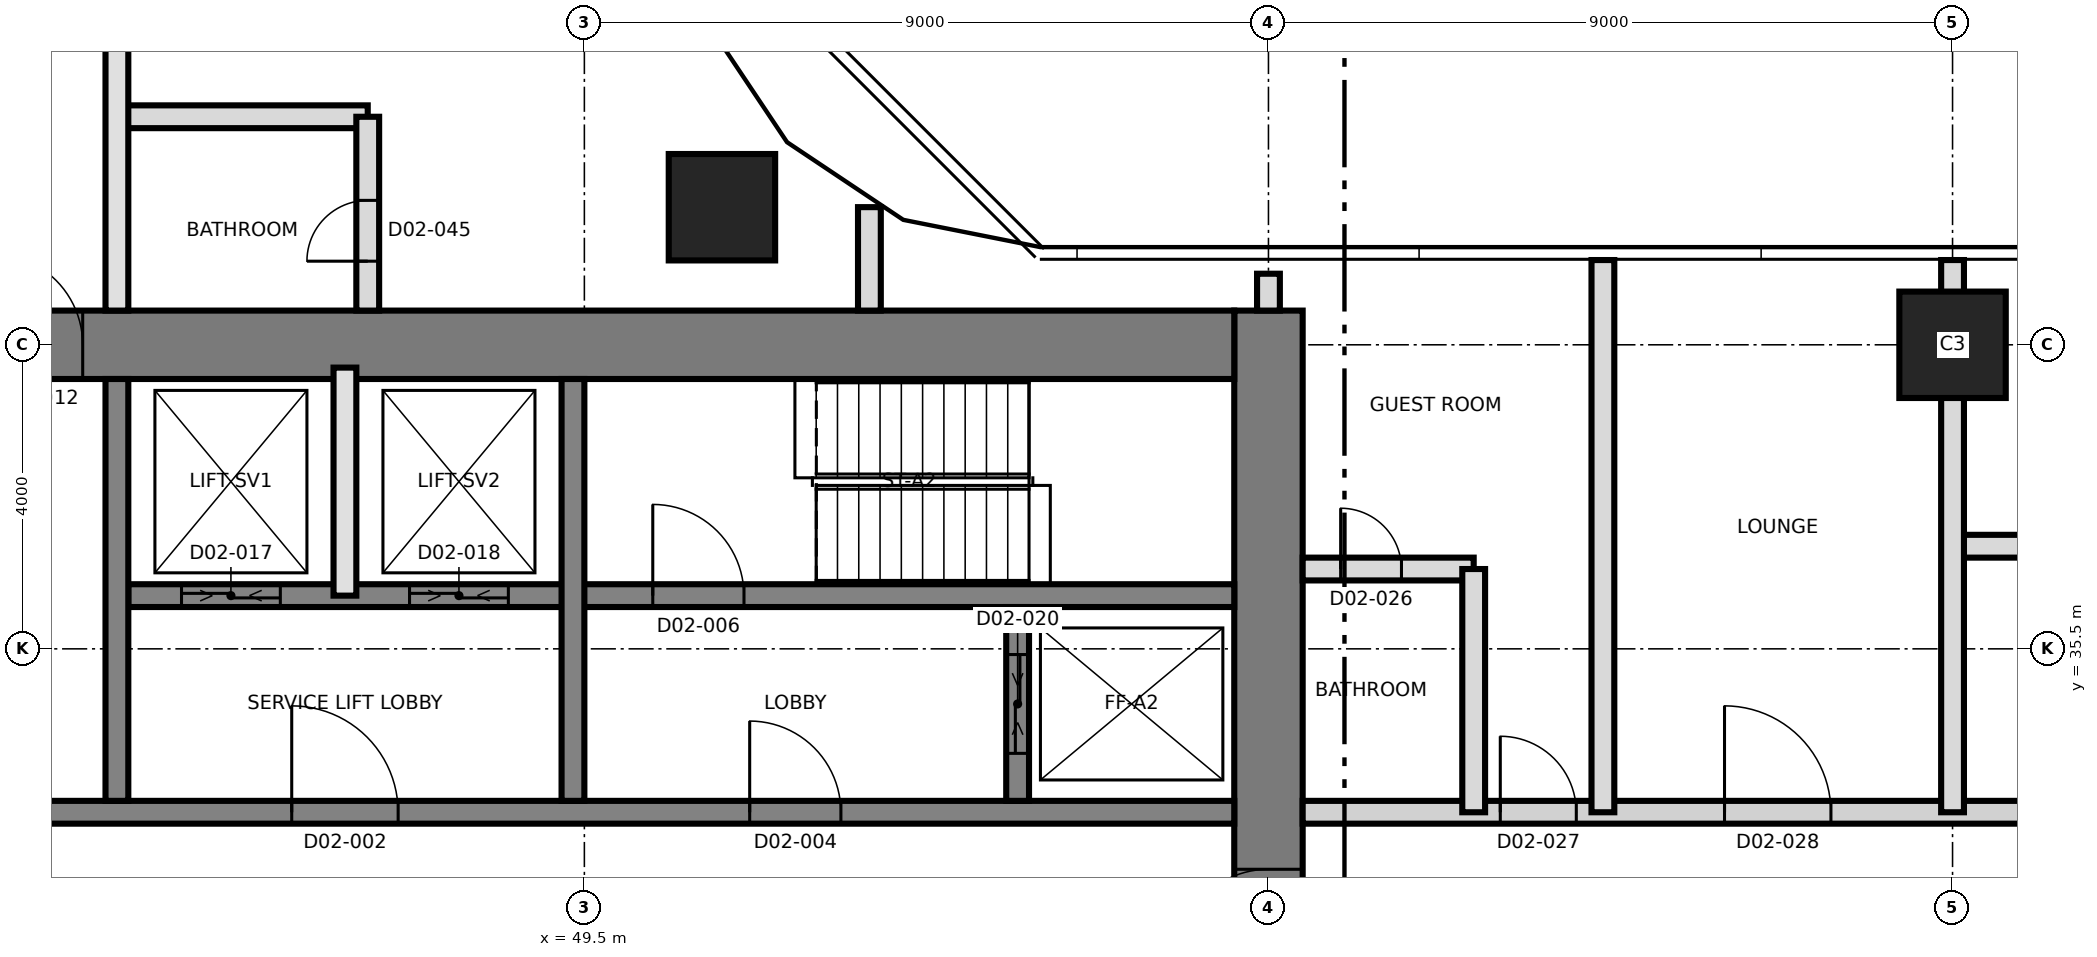
"""IFC4 building model, lengths in metres.
Left out: names, types, materials, properties, quantities, classifications, styles, units other than length and angle.
Written with IfcOpenShell. Run it as: python <this file> out.ifc"""

import sys

from ifc_helpers import new_model, si_unit, direction, frame, frame_2d, origin, origin_2d, place, context, subcontext, project, spatial, rectangle, extrude, element, fill, save


model = new_model("IFC4")
c1 = context("Model", 3, precision=1e-05, world=origin(), true_north=direction((0.0, 1.0)))
c2 = subcontext(c1, "Body", "Model", "MODEL_VIEW")
j1 = project(units=[si_unit("LENGTHUNIT", "METRE"), si_unit("PLANEANGLEUNIT", "RADIAN")], contexts=[c1])
p1 = place(None, origin())
s1 = spatial("IfcSite", under=j1, at=p1, CompositionType="ELEMENT")
p2 = place(p1, origin())
s2 = spatial("IfcBuilding", under=s1, at=p2, CompositionType="ELEMENT")
p3 = place(p2, frame((0.0, 0.0, 48.3)))
s3 = spatial("IfcBuildingStorey", under=s2, at=p3, CompositionType="ELEMENT", Elevation=48.3)
p4 = place(p3, frame((58.5, 21.05, 0.0), z_axis=(0.0, 0.0, 1.0), x_axis=(0.0, 1.0, 0.0)))
e1 = element("IfcWall", 1, at=p4, inside=s3, PredefinedType="SHEAR", context=c2, shape_type="SweptSolid", body=[
    extrude(rectangle(XDim=18.9, YDim=0.9, at=frame_2d((9.45, 0.0))), origin(), (0.0, 0.0, 1.0), 3.7),
])
p5 = place(p4, frame((10.35, 0.0, 0.0)))
e2 = element("IfcOpeningElement", 2, at=p5, cuts=e1, PredefinedType="OPENING", context=c2, shape_type="SweptSolid", body=[
    extrude(rectangle(XDim=1.2, YDim=2.1, at=frame_2d((0.6, 1.05))), frame((0.0, 0.46, 0.0), z_axis=(0.0, -1.0, 0.0), x_axis=(1.0, 0.0, 0.0)), (0.0, 0.0, 1.0), 0.92),
])
p6 = place(p3, frame((31.05, 39.5, 0.0), z_axis=(0.0, 0.0, 1.0), x_axis=(1.0, 0.0, 0.0)))
e3 = element("IfcWall", 3, at=p6, inside=s3, PredefinedType="SHEAR", context=c2, shape_type="SweptSolid", body=[
    extrude(rectangle(XDim=27.0, YDim=0.9, at=frame_2d((13.5, 0.0))), origin(), (0.0, 0.0, 1.0), 3.7),
])
p7 = place(p6, frame((10.65, 0.0, 0.0)))
e4 = element("IfcOpeningElement", 4, at=p7, cuts=e3, PredefinedType="OPENING", context=c2, shape_type="SweptSolid", body=[
    extrude(rectangle(XDim=1.2, YDim=2.1, at=frame_2d((0.6, 1.05))), frame((0.0, 0.46, 0.0), z_axis=(0.0, -1.0, 0.0), x_axis=(1.0, 0.0, 0.0)), (0.0, 0.0, 1.0), 0.92),
])
p8 = place(p3, frame((31.95, 33.35, 0.0), z_axis=(0.0, 0.0, 1.0), x_axis=(1.0, 0.0, 0.0)))
e5 = element("IfcWall", 5, at=p8, inside=s3, PredefinedType="SHEAR", context=c2, shape_type="SweptSolid", body=[
    extrude(rectangle(XDim=26.1, YDim=0.3, at=frame_2d((13.05, 0.0))), origin(), (0.0, 0.0, 1.0), 3.7),
])
p9 = place(p8, frame((13.7, 0.0, 0.0)))
e6 = element("IfcOpeningElement", 6, at=p9, cuts=e5, PredefinedType="OPENING", context=c2, shape_type="SweptSolid", body=[
    extrude(rectangle(XDim=1.4, YDim=2.1, at=frame_2d((0.7, 1.05))), frame((0.0, 0.16, 0.0), z_axis=(0.0, -1.0, 0.0), x_axis=(1.0, 0.0, 0.0)), (0.0, 0.0, 1.0), 0.32),
])
p10 = place(p8, frame((5.175, 0.0, 0.0)))
e7 = element("IfcOpeningElement", 7, at=p10, cuts=e5, PredefinedType="OPENING", context=c2, shape_type="SweptSolid", body=[
    extrude(rectangle(XDim=1.2, YDim=2.1, at=frame_2d((0.6, 1.05))), frame((0.0, 0.16, 0.0), z_axis=(0.0, -1.0, 0.0), x_axis=(1.0, 0.0, 0.0)), (0.0, 0.0, 1.0), 0.32),
])
p11 = place(p8, frame((19.725, 0.0, 0.0)))
e8 = element("IfcOpeningElement", 8, at=p11, cuts=e5, PredefinedType="OPENING", context=c2, shape_type="SweptSolid", body=[
    extrude(rectangle(XDim=1.2, YDim=2.1, at=frame_2d((0.6, 1.05))), frame((0.0, 0.16, 0.0), z_axis=(0.0, -1.0, 0.0), x_axis=(1.0, 0.0, 0.0)), (0.0, 0.0, 1.0), 0.32),
])
p12 = place(p3, frame((43.5, 36.2, 0.0), z_axis=(0.0, 0.0, 1.0), x_axis=(1.0, 0.0, 0.0)))
e9 = element("IfcWall", 9, at=p12, inside=s3, PredefinedType="SHEAR", context=c2, shape_type="SweptSolid", body=[
    extrude(rectangle(XDim=14.55, YDim=0.3, at=frame_2d((7.275, 0.0))), origin(), (0.0, 0.0, 1.0), 3.7),
])
p13 = place(p12, frame((6.9, 0.0, 0.0)))
e10 = element("IfcOpeningElement", 10, at=p13, cuts=e9, PredefinedType="OPENING", context=c2, shape_type="SweptSolid", body=[
    extrude(rectangle(XDim=1.2, YDim=2.1, at=frame_2d((0.6, 1.05))), frame((0.0, 0.16, 0.0), z_axis=(0.0, -1.0, 0.0), x_axis=(1.0, 0.0, 0.0)), (0.0, 0.0, 1.0), 0.32),
])
p14 = place(p12, frame((0.7, 0.0, 0.0)))
e11 = element("IfcOpeningElement", 11, at=p14, cuts=e9, PredefinedType="OPENING", context=c2, shape_type="SweptSolid", body=[
    extrude(rectangle(XDim=1.3, YDim=2.4, at=frame_2d((0.65, 1.2))), frame((0.0, 0.16, 0.0), z_axis=(0.0, -1.0, 0.0), x_axis=(1.0, 0.0, 0.0)), (0.0, 0.0, 1.0), 0.32),
])
p15 = place(p12, frame((3.7, 0.0, 0.0)))
e12 = element("IfcOpeningElement", 12, at=p15, cuts=e9, PredefinedType="OPENING", context=c2, shape_type="SweptSolid", body=[
    extrude(rectangle(XDim=1.3, YDim=2.4, at=frame_2d((0.65, 1.2))), frame((0.0, 0.16, 0.0), z_axis=(0.0, -1.0, 0.0), x_axis=(1.0, 0.0, 0.0)), (0.0, 0.0, 1.0), 0.32),
])
for number, where, z_axis, x_axis in (
    (13, (43.35, 33.5, 0.0), (0.0, 0.0, 1.0), (0.0, 1.0, 0.0)),
    (14, (49.35, 33.5, 0.0), (0.0, 0.0, 1.0), (0.0, 1.0, 0.0)),
):
    element("IfcWall", number, at=place(p3, frame(where, z_axis=z_axis, x_axis=x_axis)), inside=s3, PredefinedType="SHEAR", context=c2, shape_type="SweptSolid", body=[
        extrude(rectangle(XDim=5.55, YDim=0.3, at=frame_2d((2.775, 0.0))), origin(), (0.0, 0.0, 1.0), 3.7),
    ])
p16 = place(p3, frame((55.2, 33.5, 0.0), z_axis=(0.0, 0.0, 1.0), x_axis=(0.0, 1.0, 0.0)))
e15 = element("IfcWall", 15, at=p16, inside=s3, PredefinedType="SHEAR", context=c2, shape_type="SweptSolid", body=[
    extrude(rectangle(XDim=2.55, YDim=0.3, at=frame_2d((1.275, 0.0))), origin(), (0.0, 0.0, 1.0), 3.7),
])
p17 = place(p16, frame((0.625, 0.0, 0.0)))
e16 = element("IfcOpeningElement", 16, at=p17, cuts=e15, PredefinedType="OPENING", context=c2, shape_type="SweptSolid", body=[
    extrude(rectangle(XDim=1.3, YDim=2.4, at=frame_2d((0.65, 1.2))), frame((0.0, 0.16, 0.0), z_axis=(0.0, -1.0, 0.0), x_axis=(1.0, 0.0, 0.0)), (0.0, 0.0, 1.0), 0.32),
])
for number, where, z_axis, x_axis in (
    (17, (67.5, 39.5, 0.0), (0.0, 0.0, 1.0), (1.0, 0.0, 0.0)),
    (18, (51.31, 41.31, 0.0), (0.0, 0.0, 1.0), (1.0, 0.0, 0.0)),
):
    element("IfcColumn", number, at=place(p3, frame(where, z_axis=z_axis, x_axis=x_axis)), inside=s3, PredefinedType="COLUMN", context=c2, shape_type="SweptSolid", body=[
        extrude(rectangle(XDim=1.4, YDim=1.4, at=origin_2d()), origin(), (0.0, 0.0, 1.0), 3.7),
    ])
p18 = place(p3, frame((46.35, 36.2, 0.0), z_axis=(0.0, 0.0, 1.0), x_axis=(0.0, 1.0, 0.0)))
e19 = element("IfcWall", 19, at=p18, inside=s3, PredefinedType="SOLIDWALL", context=c2, shape_type="SweptSolid", body=[
    extrude(rectangle(XDim=3.0, YDim=0.3, at=frame_2d((1.5, 0.0))), origin(), (0.0, 0.0, 1.0), 3.4),
])
p19 = place(p3, frame((58.95, 33.35, 0.0), z_axis=(0.0, 0.0, 1.0), x_axis=(1.0, 0.0, 0.0)))
e20 = element("IfcWall", 20, at=p19, inside=s3, PredefinedType="PARTITIONING", context=c2, shape_type="SweptSolid", body=[
    extrude(rectangle(XDim=26.38, YDim=0.3, at=frame_2d((13.19, 0.0))), origin(), (0.0, 0.0, 1.0), 3.4),
])
p20 = place(p19, frame((2.6, 0.0, 0.0)))
e21 = element("IfcOpeningElement", 21, at=p20, cuts=e20, PredefinedType="OPENING", context=c2, shape_type="SweptSolid", body=[
    extrude(rectangle(XDim=1.0, YDim=2.1, at=frame_2d((0.5, 1.05))), frame((0.0, 0.16, 0.0), z_axis=(0.0, -1.0, 0.0), x_axis=(1.0, 0.0, 0.0)), (0.0, 0.0, 1.0), 0.32),
])
p21 = place(p19, frame((5.55, 0.0, 0.0)))
e22 = element("IfcOpeningElement", 22, at=p21, cuts=e20, PredefinedType="OPENING", context=c2, shape_type="SweptSolid", body=[
    extrude(rectangle(XDim=1.4, YDim=2.1, at=frame_2d((0.7, 1.05))), frame((0.0, 0.16, 0.0), z_axis=(0.0, -1.0, 0.0), x_axis=(1.0, 0.0, 0.0)), (0.0, 0.0, 1.0), 0.32),
])
p22 = place(p19, frame((14.2, 0.0, 0.0)))
e23 = element("IfcOpeningElement", 23, at=p22, cuts=e20, PredefinedType="OPENING", context=c2, shape_type="SweptSolid", body=[
    extrude(rectangle(XDim=1.0, YDim=2.4, at=frame_2d((0.5, 1.2))), frame((0.0, 0.16, 0.0), z_axis=(0.0, -1.0, 0.0), x_axis=(1.0, 0.0, 0.0)), (0.0, 0.0, 1.0), 0.32),
])
p23 = place(p19, frame((20.83, 0.0, 0.0)))
e24 = element("IfcOpeningElement", 24, at=p23, cuts=e20, PredefinedType="OPENING", context=c2, shape_type="SweptSolid", body=[
    extrude(rectangle(XDim=1.0, YDim=2.1, at=frame_2d((0.5, 1.05))), frame((0.0, 0.16, 0.0), z_axis=(0.0, -1.0, 0.0), x_axis=(1.0, 0.0, 0.0)), (0.0, 0.0, 1.0), 0.32),
])
p24 = place(p19, frame((22.63, 0.0, 0.0)))
e25 = element("IfcOpeningElement", 25, at=p24, cuts=e20, PredefinedType="OPENING", context=c2, shape_type="SweptSolid", body=[
    extrude(rectangle(XDim=1.0, YDim=2.1, at=frame_2d((0.5, 1.05))), frame((0.0, 0.16, 0.0), z_axis=(0.0, -1.0, 0.0), x_axis=(1.0, 0.0, 0.0)), (0.0, 0.0, 1.0), 0.32),
])
p25 = place(p3, frame((58.95, 36.55, 0.0), z_axis=(0.0, 0.0, 1.0), x_axis=(1.0, 0.0, 0.0)))
e26 = element("IfcWall", 26, at=p25, inside=s3, PredefinedType="PARTITIONING", context=c2, shape_type="SweptSolid", body=[
    extrude(rectangle(XDim=2.25, YDim=0.3, at=frame_2d((1.125, 0.0))), origin(), (0.0, 0.0, 1.0), 3.4),
])
p26 = place(p25, frame((0.5, 0.0, 0.0)))
e27 = element("IfcOpeningElement", 27, at=p26, cuts=e26, PredefinedType="OPENING", context=c2, shape_type="SweptSolid", body=[
    extrude(rectangle(XDim=0.8, YDim=2.1, at=frame_2d((0.4, 1.05))), frame((0.0, 0.16, 0.0), z_axis=(0.0, -1.0, 0.0), x_axis=(1.0, 0.0, 0.0)), (0.0, 0.0, 1.0), 0.32),
])
p27 = place(p3, frame((67.5, 36.85, 0.0), z_axis=(0.0, 0.0, 1.0), x_axis=(1.0, 0.0, 0.0)))
e28 = element("IfcWall", 28, at=p27, inside=s3, PredefinedType="PARTITIONING", context=c2, shape_type="SweptSolid", body=[
    extrude(rectangle(XDim=3.3, YDim=0.3, at=frame_2d((1.65, 0.0))), origin(), (0.0, 0.0, 1.0), 3.4),
])
p28 = place(p27, frame((1.25, 0.0, 0.0)))
e29 = element("IfcOpeningElement", 29, at=p28, cuts=e28, PredefinedType="OPENING", context=c2, shape_type="SweptSolid", body=[
    extrude(rectangle(XDim=0.8, YDim=2.1, at=frame_2d((0.4, 1.05))), frame((0.0, 0.16, 0.0), z_axis=(0.0, -1.0, 0.0), x_axis=(1.0, 0.0, 0.0)), (0.0, 0.0, 1.0), 0.32),
])
p29 = place(p3, frame((43.35, 42.5, 0.0), z_axis=(0.0, 0.0, 1.0), x_axis=(1.0, 0.0, 0.0)))
e30 = element("IfcWall", 30, at=p29, inside=s3, PredefinedType="PARTITIONING", context=c2, shape_type="SweptSolid", body=[
    extrude(rectangle(XDim=3.3, YDim=0.3, at=frame_2d((1.65, 0.0))), origin(), (0.0, 0.0, 1.0), 3.4),
])
p30 = place(p3, frame((43.35, 39.95, 0.0), z_axis=(0.0, 0.0, 1.0), x_axis=(0.0, 1.0, 0.0)))
e31 = element("IfcWall", 31, at=p30, inside=s3, PredefinedType="SOLIDWALL", context=c2, shape_type="SweptSolid", body=[
    extrude(rectangle(XDim=25.8, YDim=0.3, at=frame_2d((12.9, 0.0))), origin(), (0.0, 0.0, 1.0), 3.4),
])
p31 = place(p30, frame((3.55, 0.0, 0.0)))
e32 = element("IfcOpeningElement", 32, at=p31, cuts=e31, PredefinedType="OPENING", context=c2, shape_type="SweptSolid", body=[
    extrude(rectangle(XDim=1.0, YDim=2.4, at=frame_2d((0.5, 1.2))), frame((0.0, 0.16, 0.0), z_axis=(0.0, -1.0, 0.0), x_axis=(1.0, 0.0, 0.0)), (0.0, 0.0, 1.0), 0.32),
])
p32 = place(p30, frame((9.7, 0.0, 0.0)))
e33 = element("IfcOpeningElement", 33, at=p32, cuts=e31, PredefinedType="OPENING", context=c2, shape_type="SweptSolid", body=[
    extrude(rectangle(XDim=1.0, YDim=2.1, at=frame_2d((0.5, 1.05))), frame((0.0, 0.16, 0.0), z_axis=(0.0, -1.0, 0.0), x_axis=(1.0, 0.0, 0.0)), (0.0, 0.0, 1.0), 0.32),
])
p33 = place(p30, frame((15.55, 0.0, 0.0)))
e34 = element("IfcOpeningElement", 34, at=p33, cuts=e31, PredefinedType="OPENING", context=c2, shape_type="SweptSolid", body=[
    extrude(rectangle(XDim=1.0, YDim=2.1, at=frame_2d((0.5, 1.05))), frame((0.0, 0.16, 0.0), z_axis=(0.0, -1.0, 0.0), x_axis=(1.0, 0.0, 0.0)), (0.0, 0.0, 1.0), 0.32),
])
p34 = place(p30, frame((19.55, 0.0, 0.0)))
e35 = element("IfcOpeningElement", 35, at=p34, cuts=e31, PredefinedType="OPENING", context=c2, shape_type="SweptSolid", body=[
    extrude(rectangle(XDim=1.0, YDim=2.4, at=frame_2d((0.5, 1.2))), frame((0.0, 0.16, 0.0), z_axis=(0.0, -1.0, 0.0), x_axis=(1.0, 0.0, 0.0)), (0.0, 0.0, 1.0), 0.32),
])
p35 = place(p3, frame((46.65, 39.95, 0.0), z_axis=(0.0, 0.0, 1.0), x_axis=(0.0, 1.0, 0.0)))
e36 = element("IfcWall", 36, at=p35, inside=s3, PredefinedType="PARTITIONING", context=c2, shape_type="SweptSolid", body=[
    extrude(rectangle(XDim=2.55, YDim=0.3, at=frame_2d((1.275, 0.0))), origin(), (0.0, 0.0, 1.0), 3.4),
])
p36 = place(p35, frame((0.65, 0.0, 0.0)))
e37 = element("IfcOpeningElement", 37, at=p36, cuts=e36, PredefinedType="OPENING", context=c2, shape_type="SweptSolid", body=[
    extrude(rectangle(XDim=0.8, YDim=2.1, at=frame_2d((0.4, 1.05))), frame((0.0, 0.16, 0.0), z_axis=(0.0, -1.0, 0.0), x_axis=(1.0, 0.0, 0.0)), (0.0, 0.0, 1.0), 0.32),
])
p37 = place(p3, frame((53.25, 39.95, 0.0), z_axis=(0.0, 0.0, 1.0), x_axis=(0.0, 1.0, 0.0)))
e38 = element("IfcWall", 38, at=p37, inside=s3, PredefinedType="PARTITIONING", context=c2, shape_type="SweptSolid", body=[
    extrude(rectangle(XDim=1.361, YDim=0.3, at=frame_2d((0.681, 0.0))), origin(), (0.0, 0.0, 1.0), 3.4),
])
p38 = place(p3, frame((58.5, 39.95, 0.0), z_axis=(0.0, 0.0, 1.0), x_axis=(0.0, 1.0, 0.0)))
e39 = element("IfcWall", 39, at=p38, inside=s3, PredefinedType="PARTITIONING", context=c2, shape_type="SweptSolid", body=[
    extrude(rectangle(XDim=0.485, YDim=0.3, at=frame_2d((0.243, 0.0))), origin(), (0.0, 0.0, 1.0), 3.4),
])
p39 = place(p3, frame((61.2, 33.35, 0.0), z_axis=(0.0, 0.0, 1.0), x_axis=(0.0, 1.0, 0.0)))
e40 = element("IfcWall", 40, at=p39, inside=s3, PredefinedType="PARTITIONING", context=c2, shape_type="SweptSolid", body=[
    extrude(rectangle(XDim=3.2, YDim=0.3, at=frame_2d((1.6, 0.0))), origin(), (0.0, 0.0, 1.0), 3.4),
])
for number, where, z_axis, x_axis in (
    (41, (62.9, 33.35, 0.0), (0.0, 0.0, 1.0), (0.0, 1.0, 0.0)),
    (42, (67.5, 33.35, 0.0), (0.0, 0.0, 1.0), (0.0, 1.0, 0.0)),
):
    element("IfcWall", number, at=place(p3, frame(where, z_axis=z_axis, x_axis=x_axis)), inside=s3, PredefinedType="PARTITIONING", context=c2, shape_type="SweptSolid", body=[
        extrude(rectangle(XDim=7.265, YDim=0.3, at=frame_2d((3.632, 0.0))), origin(), (0.0, 0.0, 1.0), 3.4),
    ])
p40 = place(p9, origin())
e43 = element("IfcDoor", 43, at=p40, inside=s3, OperationType="SINGLE_SWING_RIGHT", PredefinedType="DOOR", context=c2, shape_type="SweptSolid", body=[
    extrude(rectangle(XDim=1.4, YDim=2.1, at=frame_2d((0.7, 1.05))), frame((0.0, 0.025, 0.0), z_axis=(0.0, -1.0, 0.0), x_axis=(1.0, 0.0, 0.0)), (0.0, 0.0, 1.0), 0.05),
])
fill(e6, e43)
p41 = place(p11, origin())
e44 = element("IfcDoor", 44, at=p41, inside=s3, OperationType="SINGLE_SWING_RIGHT", PredefinedType="DOOR", context=c2, shape_type="SweptSolid", body=[
    extrude(rectangle(XDim=1.2, YDim=2.1, at=frame_2d((0.6, 1.05))), frame((0.0, 0.025, 0.0), z_axis=(0.0, -1.0, 0.0), x_axis=(1.0, 0.0, 0.0)), (0.0, 0.0, 1.0), 0.05),
])
fill(e8, e44)
p42 = place(p13, origin())
e45 = element("IfcDoor", 45, at=p42, inside=s3, OperationType="SINGLE_SWING_LEFT", PredefinedType="DOOR", context=c2, shape_type="SweptSolid", body=[
    extrude(rectangle(XDim=1.2, YDim=2.1, at=frame_2d((0.6, 1.05))), frame((0.0, 0.025, 0.0), z_axis=(0.0, -1.0, 0.0), x_axis=(1.0, 0.0, 0.0)), (0.0, 0.0, 1.0), 0.05),
])
fill(e10, e45)
p43 = place(p5, origin())
e46 = element("IfcDoor", 46, at=p43, inside=s3, OperationType="SINGLE_SWING_LEFT", PredefinedType="DOOR", context=c2, shape_type="SweptSolid", body=[
    extrude(rectangle(XDim=1.2, YDim=2.1, at=frame_2d((0.6, 1.05))), frame((0.0, 0.025, 0.0), z_axis=(0.0, -1.0, 0.0), x_axis=(1.0, 0.0, 0.0)), (0.0, 0.0, 1.0), 0.05),
])
fill(e2, e46)
p44 = place(p7, origin())
e47 = element("IfcDoor", 47, at=p44, inside=s3, OperationType="SINGLE_SWING_RIGHT", PredefinedType="DOOR", context=c2, shape_type="SweptSolid", body=[
    extrude(rectangle(XDim=1.2, YDim=2.1, at=frame_2d((0.6, 1.05))), frame((0.0, 0.025, 0.0), z_axis=(0.0, -1.0, 0.0), x_axis=(1.0, 0.0, 0.0)), (0.0, 0.0, 1.0), 0.05),
])
fill(e4, e47)
p45 = place(p14, origin())
e48 = element("IfcDoor", 48, at=p45, inside=s3, OperationType="SLIDING_TO_LEFT", PredefinedType="DOOR", context=c2, shape_type="SweptSolid", body=[
    extrude(rectangle(XDim=1.3, YDim=2.4, at=frame_2d((0.65, 1.2))), frame((0.0, 0.025, 0.0), z_axis=(0.0, -1.0, 0.0), x_axis=(1.0, 0.0, 0.0)), (0.0, 0.0, 1.0), 0.05),
])
fill(e11, e48)
p46 = place(p15, origin())
e49 = element("IfcDoor", 49, at=p46, inside=s3, OperationType="SLIDING_TO_LEFT", PredefinedType="DOOR", context=c2, shape_type="SweptSolid", body=[
    extrude(rectangle(XDim=1.3, YDim=2.4, at=frame_2d((0.65, 1.2))), frame((0.0, 0.025, 0.0), z_axis=(0.0, -1.0, 0.0), x_axis=(1.0, 0.0, 0.0)), (0.0, 0.0, 1.0), 0.05),
])
fill(e12, e49)
p47 = place(p17, origin())
e50 = element("IfcDoor", 50, at=p47, inside=s3, OperationType="SLIDING_TO_LEFT", PredefinedType="DOOR", context=c2, shape_type="SweptSolid", body=[
    extrude(rectangle(XDim=1.3, YDim=2.4, at=frame_2d((0.65, 1.2))), frame((0.0, 0.025, 0.0), z_axis=(0.0, -1.0, 0.0), x_axis=(1.0, 0.0, 0.0)), (0.0, 0.0, 1.0), 0.05),
])
fill(e16, e50)
p48 = place(p26, origin())
e51 = element("IfcDoor", 51, at=p48, inside=s3, OperationType="SINGLE_SWING_LEFT", PredefinedType="DOOR", context=c2, shape_type="SweptSolid", body=[
    extrude(rectangle(XDim=0.8, YDim=2.1, at=frame_2d((0.4, 1.05))), frame((0.0, 0.025, 0.0), z_axis=(0.0, -1.0, 0.0), x_axis=(1.0, 0.0, 0.0)), (0.0, 0.0, 1.0), 0.05),
])
fill(e27, e51)
p49 = place(p20, origin())
e52 = element("IfcDoor", 52, at=p49, inside=s3, OperationType="SINGLE_SWING_LEFT", PredefinedType="DOOR", context=c2, shape_type="SweptSolid", body=[
    extrude(rectangle(XDim=1.0, YDim=2.1, at=frame_2d((0.5, 1.05))), frame((0.0, 0.025, 0.0), z_axis=(0.0, -1.0, 0.0), x_axis=(1.0, 0.0, 0.0)), (0.0, 0.0, 1.0), 0.05),
])
fill(e21, e52)
p50 = place(p21, origin())
e53 = element("IfcDoor", 53, at=p50, inside=s3, OperationType="SINGLE_SWING_RIGHT", PredefinedType="DOOR", context=c2, shape_type="SweptSolid", body=[
    extrude(rectangle(XDim=1.4, YDim=2.1, at=frame_2d((0.7, 1.05))), frame((0.0, 0.025, 0.0), z_axis=(0.0, -1.0, 0.0), x_axis=(1.0, 0.0, 0.0)), (0.0, 0.0, 1.0), 0.05),
])
fill(e22, e53)
p51 = place(p36, origin())
e54 = element("IfcDoor", 54, at=p51, inside=s3, OperationType="SINGLE_SWING_RIGHT", PredefinedType="DOOR", context=c2, shape_type="SweptSolid", body=[
    extrude(rectangle(XDim=0.8, YDim=2.1, at=frame_2d((0.4, 1.05))), frame((0.0, 0.025, 0.0), z_axis=(0.0, -1.0, 0.0), x_axis=(1.0, 0.0, 0.0)), (0.0, 0.0, 1.0), 0.05),
])
fill(e37, e54)
save(model, sys.argv[1])
